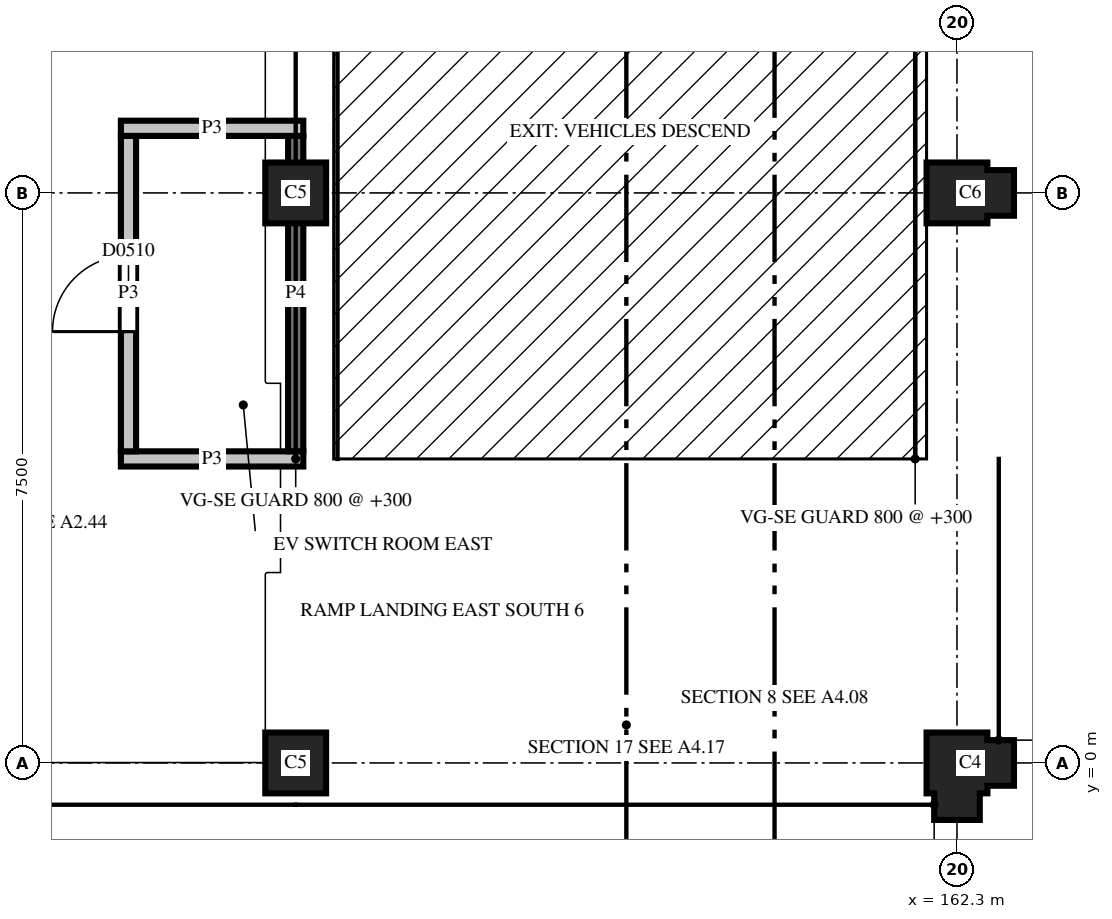
"""IFC4 building model, lengths in metres.
Left out: names, types, materials, properties, quantities, classifications, styles, units other than length and angle.
Written with IfcOpenShell. Run it as: python <this file> out.ifc"""

import sys

from ifc_helpers import new_model, si_unit, direction, frame, frame_2d, origin, place, context, subcontext, project, spatial, polyline, rectangle, outline, extrude, element, fill, save


model = new_model("IFC4")
c1 = context("Model", 3, precision=1e-05, world=origin(), true_north=direction((0.0, 1.0)))
c2 = subcontext(c1, "Body", "Model", "MODEL_VIEW")
j1 = project(units=[si_unit("LENGTHUNIT", "METRE"), si_unit("PLANEANGLEUNIT", "RADIAN")], contexts=[c1])
p1 = place(None, origin())
s1 = spatial("IfcSite", under=j1, at=p1, CompositionType="ELEMENT")
p2 = place(p1, origin())
s2 = spatial("IfcBuilding", under=s1, at=p2, CompositionType="ELEMENT")
p3 = place(p2, frame((0.0, 0.0, 19.3)))
s3 = spatial("IfcBuildingStorey", under=s2, at=p3, CompositionType="ELEMENT", Elevation=19.3)
p4 = place(p3, frame((153.6, 0.0, 0.0), z_axis=(0.0, 0.0, 1.0), x_axis=(1.0, 0.0, 0.0)))
e1 = element("IfcColumn", 1, at=p4, inside=s3, PredefinedType="COLUMN", context=c2, shape_type="SweptSolid", body=[
    extrude(outline(polyline([(-0.4, -0.4), (0.4, -0.4), (0.4, 0.4), (-0.4, 0.4), (-0.4, -0.4)])), origin(), (0.0, 0.0, 1.0), 3.7),
])
p5 = place(p3, frame((162.3, 0.0, 0.0), z_axis=(0.0, 0.0, 1.0), x_axis=(0.0, -1.0, 0.0)))
e2 = element("IfcColumn", 2, at=p5, inside=s3, PredefinedType="COLUMN", context=c2, shape_type="SweptSolid", body=[
    extrude(outline(polyline([(-0.4, -0.4), (0.4, -0.4), (0.4, -0.3), (0.75, -0.3), (0.75, 0.3), (0.4, 0.3), (0.4, 0.4), (0.3, 0.4), (0.3, 0.75), (-0.3, 0.75), (-0.3, 0.4), (-0.4, 0.4), (-0.4, -0.4)])), origin(), (0.0, 0.0, 1.0), 3.7),
])
p6 = place(p3, frame((153.6, 7.5, 0.0), z_axis=(0.0, 0.0, 1.0), x_axis=(1.0, 0.0, 0.0)))
e3 = element("IfcColumn", 3, at=p6, inside=s3, PredefinedType="COLUMN", context=c2, shape_type="SweptSolid", body=[
    extrude(outline(polyline([(-0.4, -0.4), (0.4, -0.4), (0.4, 0.4), (-0.4, 0.4), (-0.4, -0.4)])), origin(), (0.0, 0.0, 1.0), 3.7),
])
p7 = place(p3, frame((162.3, 7.5, 0.0), z_axis=(0.0, 0.0, 1.0), x_axis=(1.0, 0.0, 0.0)))
e4 = element("IfcColumn", 4, at=p7, inside=s3, PredefinedType="COLUMN", context=c2, shape_type="SweptSolid", body=[
    extrude(outline(polyline([(-0.4, -0.4), (0.4, -0.4), (0.4, -0.3), (0.75, -0.3), (0.75, 0.3), (0.4, 0.3), (0.4, 0.4), (-0.4, 0.4), (-0.4, -0.4)])), origin(), (0.0, 0.0, 1.0), 3.7),
])
p8 = place(p3, frame((151.3, 4.0, 0.0), z_axis=(0.0, 0.0, 1.0), x_axis=(1.0, 0.0, 0.0)))
e5 = element("IfcWall", 5, at=p8, inside=s3, PredefinedType="PARTITIONING", context=c2, shape_type="SweptSolid", body=[
    extrude(rectangle(XDim=2.4, YDim=0.2, at=frame_2d((1.2, 0.0))), origin(), (0.0, 0.0, 1.0), 2.88),
])
p9 = place(p3, frame((153.6, 4.1, 0.0), z_axis=(0.0, 0.0, 1.0), x_axis=(0.0, 1.0, 0.0)))
e6 = element("IfcWall", 6, at=p9, inside=s3, PredefinedType="PARTITIONING", context=c2, shape_type="SweptSolid", body=[
    extrude(rectangle(XDim=4.15, YDim=0.2, at=frame_2d((2.075, 0.0))), origin(), (0.0, 0.0, 1.0), 2.6),
])
p10 = place(p3, frame((151.4, 8.25, 0.0), z_axis=(0.0, 0.0, 1.0), x_axis=(0.0, -1.0, 0.0)))
e7 = element("IfcWall", 7, at=p10, inside=s3, PredefinedType="PARTITIONING", context=c2, shape_type="SweptSolid", body=[
    extrude(rectangle(XDim=4.15, YDim=0.2, at=frame_2d((2.075, 0.0))), origin(), (0.0, 0.0, 1.0), 2.88),
])
p11 = place(p10, frame((1.575, 0.0, 0.0)))
e8 = element("IfcOpeningElement", 8, at=p11, cuts=e7, PredefinedType="OPENING", context=c2, shape_type="SweptSolid", body=[
    extrude(rectangle(XDim=1.0, YDim=2.1, at=frame_2d((0.5, 1.05))), frame((0.0, 0.11, 0.0), z_axis=(0.0, -1.0, 0.0), x_axis=(1.0, 0.0, 0.0)), (0.0, 0.0, 1.0), 0.22),
])
p12 = place(p3, frame((153.7, 8.35, 0.0), z_axis=(0.0, 0.0, 1.0), x_axis=(-1.0, 0.0, 0.0)))
e9 = element("IfcWall", 9, at=p12, inside=s3, PredefinedType="PARTITIONING", context=c2, shape_type="SweptSolid", body=[
    extrude(rectangle(XDim=2.4, YDim=0.2, at=frame_2d((1.2, 0.0))), origin(), (0.0, 0.0, 1.0), 2.88),
])
p13 = place(p11, origin())
e10 = element("IfcDoor", 10, at=p13, inside=s3, OperationType="SINGLE_SWING_RIGHT", PredefinedType="DOOR", context=c2, shape_type="SweptSolid", body=[
    extrude(rectangle(XDim=1.0, YDim=2.1, at=frame_2d((0.5, 1.05))), frame((0.0, 0.025, 0.0), z_axis=(0.0, -1.0, 0.0), x_axis=(1.0, 0.0, 0.0)), (0.0, 0.0, 1.0), 0.05),
])
fill(e8, e10)
save(model, sys.argv[1])
